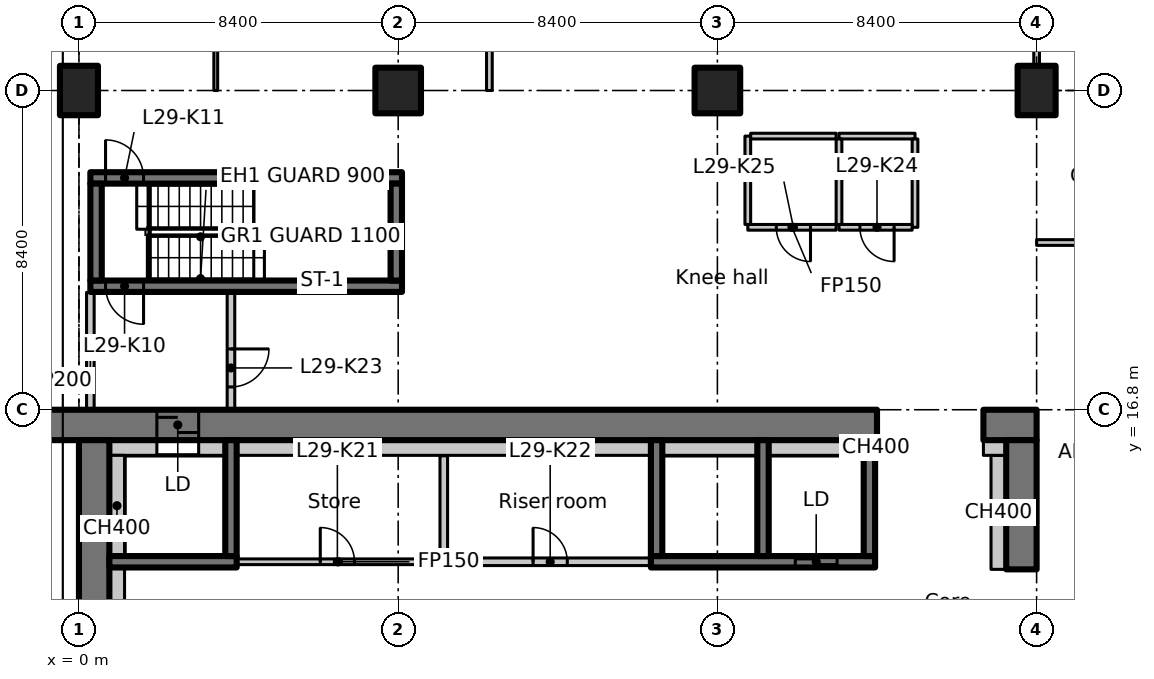
"""IFC4 building model, lengths in metres.
Left out: names, types, materials, properties, quantities, classifications, styles, units other than length and angle.
Written with IfcOpenShell. Run it as: python <this file> out.ifc"""

import sys

from ifc_helpers import new_model, si_unit, direction, frame, frame_2d, origin, origin_2d, place, context, subcontext, project, spatial, polyline, rectangle, outline, extrude, element, fill, save


model = new_model("IFC4")
c1 = context("Model", 3, precision=1e-05, world=origin(), true_north=direction((0.0, 1.0)))
c2 = subcontext(c1, "Body", "Model", "MODEL_VIEW")
j1 = project(units=[si_unit("LENGTHUNIT", "METRE"), si_unit("PLANEANGLEUNIT", "RADIAN")], contexts=[c1])
p1 = place(None, origin())
s1 = spatial("IfcSite", under=j1, at=p1, CompositionType="ELEMENT")
p2 = place(p1, origin())
s2 = spatial("IfcBuilding", under=s1, at=p2, CompositionType="ELEMENT")
p3 = place(p2, frame((0.0, 0.0, 120.5)))
s3 = spatial("IfcBuildingStorey", under=s2, at=p3, CompositionType="ELEMENT", Elevation=120.5)
p4 = place(p3, frame((0.0, 25.2, 0.0), z_axis=(0.0, 0.0, 1.0), x_axis=(1.0, 0.0, 0.0)))
e1 = element("IfcColumn", 1, at=p4, inside=s3, PredefinedType="COLUMN", context=c2, shape_type="SweptSolid", body=[
    extrude(rectangle(XDim=1.0, YDim=1.3, at=origin_2d()), origin(), (0.0, 0.0, 1.0), 3.35),
])
for number, where, z_axis, x_axis in (
    (2, (8.4, 25.2, 0.0), (0.0, 0.0, 1.0), (1.0, 0.0, 0.0)),
    (3, (16.8, 25.2, 0.0), (0.0, 0.0, 1.0), (1.0, 0.0, 0.0)),
):
    element("IfcColumn", number, at=place(p3, frame(where, z_axis=z_axis, x_axis=x_axis)), inside=s3, PredefinedType="COLUMN", context=c2, shape_type="SweptSolid", body=[
        extrude(rectangle(XDim=1.2, YDim=1.2, at=origin_2d()), origin(), (0.0, 0.0, 1.0), 3.35),
    ])
p5 = place(p3, frame((25.2, 25.2, 0.0), z_axis=(0.0, 0.0, 1.0), x_axis=(1.0, 0.0, 0.0)))
e4 = element("IfcColumn", 4, at=p5, inside=s3, PredefinedType="COLUMN", context=c2, shape_type="SweptSolid", body=[
    extrude(rectangle(XDim=1.0, YDim=1.3, at=origin_2d()), origin(), (0.0, 0.0, 1.0), 3.35),
])
p6 = place(p3, frame((-1.1, 16.4, 0.0), z_axis=(0.0, 0.0, 1.0), x_axis=(1.0, 0.0, 0.0)))
e5 = element("IfcWall", 5, at=p6, inside=s3, PredefinedType="SHEAR", context=c2, shape_type="SweptSolid", body=[
    extrude(rectangle(XDim=22.1, YDim=0.8, at=frame_2d((11.05, 0.0))), origin(), (0.0, 0.0, 1.0), 3.35),
])
p7 = place(p6, frame((3.15, 0.0, 0.0)))
e6 = element("IfcOpeningElement", 6, at=p7, cuts=e5, PredefinedType="OPENING", context=c2, shape_type="SweptSolid", body=[
    extrude(rectangle(XDim=1.1, YDim=2.3, at=frame_2d((0.55, 1.15))), frame((0.0, 0.41, 0.0), z_axis=(0.0, -1.0, 0.0), x_axis=(1.0, 0.0, 0.0)), (0.0, 0.0, 1.0), 0.82),
])
p8 = place(p3, frame((23.8, 16.4, 0.0), z_axis=(0.0, 0.0, 1.0), x_axis=(1.0, 0.0, 0.0)))
e7 = element("IfcWall", 7, at=p8, inside=s3, PredefinedType="SHEAR", context=c2, shape_type="SweptSolid", body=[
    extrude(rectangle(XDim=1.4, YDim=0.8, at=frame_2d((0.7, 0.0))), origin(), (0.0, 0.0, 1.0), 3.35),
])
p9 = place(p3, frame((0.4, 7.136, 0.0), z_axis=(0.0, 0.0, 1.0), x_axis=(0.0, 1.0, 0.0)))
e8 = element("IfcWall", 8, at=p9, inside=s3, PredefinedType="SHEAR", context=c2, shape_type="SweptSolid", body=[
    extrude(rectangle(XDim=8.864, YDim=0.8, at=frame_2d((4.432, 0.0))), origin(), (0.0, 0.0, 1.0), 3.35),
])
p10 = place(p3, frame((24.8, 12.6, 0.0), z_axis=(0.0, 0.0, 1.0), x_axis=(0.0, 1.0, 0.0)))
e9 = element("IfcWall", 9, at=p10, inside=s3, PredefinedType="SHEAR", context=c2, shape_type="SweptSolid", body=[
    extrude(rectangle(XDim=3.4, YDim=0.8, at=frame_2d((1.7, 0.0))), origin(), (0.0, 0.0, 1.0), 3.35),
])
p11 = place(p3, frame((24.2, 12.6, 0.0), z_axis=(0.0, 0.0, 1.0), x_axis=(0.0, 1.0, 0.0)))
e10 = element("IfcWall", 10, at=p11, inside=s3, PredefinedType="PARTITIONING", context=c2, shape_type="SweptSolid", body=[
    extrude(rectangle(XDim=3.0, YDim=0.4, at=frame_2d((1.5, 0.0))), origin(), (0.0, 0.0, 1.0), 3.35),
])
p12 = place(p3, frame((0.8, 15.8, 0.0), z_axis=(0.0, 0.0, 1.0), x_axis=(1.0, 0.0, 0.0)))
e11 = element("IfcWall", 11, at=p12, inside=s3, PredefinedType="PARTITIONING", context=c2, shape_type="SweptSolid", body=[
    extrude(rectangle(XDim=1.25, YDim=0.4, at=frame_2d((0.625, 0.0))), origin(), (0.0, 0.0, 1.0), 3.35),
])
p13 = place(p3, frame((23.8, 15.8, 0.0), z_axis=(0.0, 0.0, 1.0), x_axis=(1.0, 0.0, 0.0)))
e12 = element("IfcWall", 12, at=p13, inside=s3, PredefinedType="PARTITIONING", context=c2, shape_type="SweptSolid", body=[
    extrude(rectangle(XDim=0.6, YDim=0.4, at=frame_2d((0.3, 0.0))), origin(), (0.0, 0.0, 1.0), 3.35),
])
p14 = place(p3, frame((0.8, 12.8, 0.0), z_axis=(0.0, 0.0, 1.0), x_axis=(1.0, 0.0, 0.0)))
e13 = element("IfcWall", 13, at=p14, inside=s3, PredefinedType="SHEAR", context=c2, shape_type="SweptSolid", body=[
    extrude(rectangle(XDim=3.35, YDim=0.3, at=frame_2d((1.675, 0.0))), origin(), (0.0, 0.0, 1.0), 3.35),
])
p15 = place(p3, frame((4.0, 12.95, 0.0), z_axis=(0.0, 0.0, 1.0), x_axis=(0.0, 1.0, 0.0)))
e14 = element("IfcWall", 14, at=p15, inside=s3, PredefinedType="SHEAR", context=c2, shape_type="SweptSolid", body=[
    extrude(rectangle(XDim=3.05, YDim=0.3, at=frame_2d((1.525, 0.0))), origin(), (0.0, 0.0, 1.0), 3.35),
])
p16 = place(p3, frame((15.05, 12.8, 0.0), z_axis=(0.0, 0.0, 1.0), x_axis=(1.0, 0.0, 0.0)))
e15 = element("IfcWall", 15, at=p16, inside=s3, PredefinedType="SHEAR", context=c2, shape_type="SweptSolid", body=[
    extrude(rectangle(XDim=5.9, YDim=0.3, at=frame_2d((2.95, 0.0))), origin(), (0.0, 0.0, 1.0), 3.35),
])
p17 = place(p16, frame((3.8, 0.0, 0.0)))
e16 = element("IfcOpeningElement", 16, at=p17, cuts=e15, PredefinedType="OPENING", context=c2, shape_type="SweptSolid", body=[
    extrude(rectangle(XDim=1.1, YDim=2.3, at=frame_2d((0.55, 1.15))), frame((0.0, 0.16, 0.0), z_axis=(0.0, -1.0, 0.0), x_axis=(1.0, 0.0, 0.0)), (0.0, 0.0, 1.0), 0.32),
])
for number, where, z_axis, x_axis in (
    (17, (15.2, 12.95, 0.0), (0.0, 0.0, 1.0), (0.0, 1.0, 0.0)),
    (18, (18.0, 12.95, 0.0), (0.0, 0.0, 1.0), (0.0, 1.0, 0.0)),
    (19, (20.8, 12.95, 0.0), (0.0, 0.0, 1.0), (0.0, 1.0, 0.0)),
):
    element("IfcWall", number, at=place(p3, frame(where, z_axis=z_axis, x_axis=x_axis)), inside=s3, PredefinedType="SHEAR", context=c2, shape_type="SweptSolid", body=[
        extrude(rectangle(XDim=3.05, YDim=0.3, at=frame_2d((1.525, 0.0))), origin(), (0.0, 0.0, 1.0), 3.35),
    ])
p18 = place(p3, frame((8.5, 20.05, 0.0), z_axis=(0.0, 0.0, 1.0), x_axis=(-1.0, 0.0, 0.0)))
e20 = element("IfcWall", 20, at=p18, inside=s3, PredefinedType="SHEAR", context=c2, shape_type="SweptSolid", body=[
    extrude(rectangle(XDim=8.2, YDim=0.3, at=frame_2d((4.1, 0.0))), origin(), (0.0, 0.0, 1.0), 3.35),
])
p19 = place(p18, frame((6.8, 0.0, 0.0)))
e21 = element("IfcOpeningElement", 21, at=p19, cuts=e20, PredefinedType="OPENING", context=c2, shape_type="SweptSolid", body=[
    extrude(rectangle(XDim=1.0, YDim=2.1, at=frame_2d((0.5, 1.05))), frame((0.0, 0.16, 0.0), z_axis=(0.0, -1.0, 0.0), x_axis=(1.0, 0.0, 0.0)), (0.0, 0.0, 1.0), 0.32),
])
p20 = place(p3, frame((0.3, 22.9, 0.0), z_axis=(0.0, 0.0, 1.0), x_axis=(1.0, 0.0, 0.0)))
e22 = element("IfcWall", 22, at=p20, inside=s3, PredefinedType="SHEAR", context=c2, shape_type="SweptSolid", body=[
    extrude(rectangle(XDim=8.2, YDim=0.3, at=frame_2d((4.1, 0.0))), origin(), (0.0, 0.0, 1.0), 3.35),
])
p21 = place(p20, frame((0.4, 0.0, 0.0)))
e23 = element("IfcOpeningElement", 23, at=p21, cuts=e22, PredefinedType="OPENING", context=c2, shape_type="SweptSolid", body=[
    extrude(rectangle(XDim=1.0, YDim=2.1, at=frame_2d((0.5, 1.05))), frame((0.0, 0.16, 0.0), z_axis=(0.0, -1.0, 0.0), x_axis=(1.0, 0.0, 0.0)), (0.0, 0.0, 1.0), 0.32),
])
for number, where, z_axis, x_axis in (
    (24, (0.45, 20.2, 0.0), (0.0, 0.0, 1.0), (0.0, 1.0, 0.0)),
    (25, (8.35, 20.2, 0.0), (0.0, 0.0, 1.0), (0.0, 1.0, 0.0)),
):
    element("IfcWall", number, at=place(p3, frame(where, z_axis=z_axis, x_axis=x_axis)), inside=s3, PredefinedType="SHEAR", context=c2, shape_type="SweptSolid", body=[
        extrude(rectangle(XDim=2.55, YDim=0.3, at=frame_2d((1.275, 0.0))), origin(), (0.0, 0.0, 1.0), 3.35),
    ])
p22 = place(p3, frame((0.3, 16.812, 0.0), z_axis=(0.0, 0.0, 1.0), x_axis=(0.0, 1.0, 0.0)))
e26 = element("IfcWall", 26, at=p22, inside=s3, PredefinedType="PARTITIONING", context=c2, shape_type="SweptSolid", body=[
    extrude(rectangle(XDim=3.076, YDim=0.2, at=frame_2d((1.538, 0.0))), origin(), (0.0, 0.0, 1.0), 2.98),
])
p23 = place(p3, frame((4.0, 19.888, 0.0), z_axis=(0.0, 0.0, 1.0), x_axis=(0.0, -1.0, 0.0)))
e27 = element("IfcWall", 27, at=p23, inside=s3, PredefinedType="PARTITIONING", context=c2, shape_type="SweptSolid", body=[
    extrude(rectangle(XDim=3.076, YDim=0.2, at=frame_2d((1.538, 0.0))), origin(), (0.0, 0.0, 1.0), 3.35),
])
p24 = place(p23, frame((1.488, 0.0, 0.0)))
e28 = element("IfcOpeningElement", 28, at=p24, cuts=e27, PredefinedType="OPENING", context=c2, shape_type="SweptSolid", body=[
    extrude(rectangle(XDim=1.0, YDim=2.1, at=frame_2d((0.5, 1.05))), frame((0.0, 0.11, 0.0), z_axis=(0.0, -1.0, 0.0), x_axis=(1.0, 0.0, 0.0)), (0.0, 0.0, 1.0), 0.22),
])
p25 = place(p3, frame((9.6, 15.588, 0.0), z_axis=(0.0, 0.0, 1.0), x_axis=(0.0, -1.0, 0.0)))
e29 = element("IfcWall", 29, at=p25, inside=s3, PredefinedType="PARTITIONING", context=c2, shape_type="SweptSolid", body=[
    extrude(rectangle(XDim=2.788, YDim=0.2, at=frame_2d((1.394, 0.0))), origin(), (0.0, 0.0, 1.0), 3.35),
])
p26 = place(p3, frame((9.7, 12.8, 0.0), z_axis=(0.0, 0.0, 1.0), x_axis=(1.0, 0.0, 0.0)))
e30 = element("IfcWall", 30, at=p26, inside=s3, PredefinedType="PARTITIONING", context=c2, shape_type="SweptSolid", body=[
    extrude(rectangle(XDim=5.338, YDim=0.2, at=frame_2d((2.669, 0.0))), origin(), (0.0, 0.0, 1.0), 3.35),
])
p27 = place(p26, frame((2.25, 0.0, 0.0)))
e31 = element("IfcOpeningElement", 31, at=p27, cuts=e30, PredefinedType="OPENING", context=c2, shape_type="SweptSolid", body=[
    extrude(rectangle(XDim=0.9, YDim=2.1, at=frame_2d((0.45, 1.05))), frame((0.0, 0.11, 0.0), z_axis=(0.0, -1.0, 0.0), x_axis=(1.0, 0.0, 0.0)), (0.0, 0.0, 1.0), 0.22),
])
p28 = place(p3, frame((4.162, 12.8, 0.0), z_axis=(0.0, 0.0, 1.0), x_axis=(1.0, 0.0, 0.0)))
e32 = element("IfcWall", 32, at=p28, inside=s3, PredefinedType="PARTITIONING", context=c2, shape_type="SweptSolid", body=[
    extrude(rectangle(XDim=5.338, YDim=0.15, at=frame_2d((2.669, 0.0))), origin(), (0.0, 0.0, 1.0), 3.35),
])
p29 = place(p28, frame((2.188, 0.0, 0.0)))
e33 = element("IfcOpeningElement", 33, at=p29, cuts=e32, PredefinedType="OPENING", context=c2, shape_type="SweptSolid", body=[
    extrude(rectangle(XDim=0.9, YDim=2.1, at=frame_2d((0.45, 1.05))), frame((0.0, 0.085, 0.0), z_axis=(0.0, -1.0, 0.0), x_axis=(1.0, 0.0, 0.0)), (0.0, 0.0, 1.0), 0.17),
])
p30 = place(p3, frame((20.0, 24.0, 0.0), z_axis=(0.0, 0.0, 1.0), x_axis=(1.0, 0.0, 0.0)))
e34 = element("IfcWall", 34, at=p30, inside=s3, PredefinedType="PARTITIONING", context=c2, shape_type="SweptSolid", body=[
    extrude(rectangle(XDim=2.0, YDim=0.15, at=frame_2d((1.0, 0.0))), origin(), (0.0, 0.0, 1.0), 3.35),
])
p31 = place(p3, frame((22.0, 23.925, 0.0), z_axis=(0.0, 0.0, 1.0), x_axis=(0.0, -1.0, 0.0)))
e35 = element("IfcWall", 35, at=p31, inside=s3, PredefinedType="PARTITIONING", context=c2, shape_type="SweptSolid", body=[
    extrude(rectangle(XDim=2.325, YDim=0.15, at=frame_2d((1.163, 0.0))), origin(), (0.0, 0.0, 1.0), 3.35),
])
p32 = place(p3, frame((21.925, 21.6, 0.0), z_axis=(0.0, 0.0, 1.0), x_axis=(-1.0, 0.0, 0.0)))
e36 = element("IfcWall", 36, at=p32, inside=s3, PredefinedType="PARTITIONING", context=c2, shape_type="SweptSolid", body=[
    extrude(rectangle(XDim=1.925, YDim=0.15, at=frame_2d((0.962, 0.0))), origin(), (0.0, 0.0, 1.0), 3.35),
])
p33 = place(p32, frame((0.475, 0.0, 0.0)))
e37 = element("IfcOpeningElement", 37, at=p33, cuts=e36, PredefinedType="OPENING", context=c2, shape_type="SweptSolid", body=[
    extrude(rectangle(XDim=0.9, YDim=2.1, at=frame_2d((0.45, 1.05))), frame((0.0, 0.085, 0.0), z_axis=(0.0, -1.0, 0.0), x_axis=(1.0, 0.0, 0.0)), (0.0, 0.0, 1.0), 0.17),
])
p34 = place(p3, frame((20.0, 21.675, 0.0), z_axis=(0.0, 0.0, 1.0), x_axis=(0.0, 1.0, 0.0)))
e38 = element("IfcWall", 38, at=p34, inside=s3, PredefinedType="PARTITIONING", context=c2, shape_type="SweptSolid", body=[
    extrude(rectangle(XDim=2.25, YDim=0.15, at=frame_2d((1.125, 0.0))), origin(), (0.0, 0.0, 1.0), 3.35),
])
p35 = place(p3, frame((19.925, 21.6, 0.0), z_axis=(0.0, 0.0, 1.0), x_axis=(-1.0, 0.0, 0.0)))
e39 = element("IfcWall", 39, at=p35, inside=s3, PredefinedType="PARTITIONING", context=c2, shape_type="SweptSolid", body=[
    extrude(rectangle(XDim=2.325, YDim=0.15, at=frame_2d((1.163, 0.0))), origin(), (0.0, 0.0, 1.0), 3.35),
])
p36 = place(p35, frame((0.675, 0.0, 0.0)))
e40 = element("IfcOpeningElement", 40, at=p36, cuts=e39, PredefinedType="OPENING", context=c2, shape_type="SweptSolid", body=[
    extrude(rectangle(XDim=0.9, YDim=2.1, at=frame_2d((0.45, 1.05))), frame((0.0, 0.085, 0.0), z_axis=(0.0, -1.0, 0.0), x_axis=(1.0, 0.0, 0.0)), (0.0, 0.0, 1.0), 0.17),
])
p37 = place(p3, frame((17.6, 21.675, 0.0), z_axis=(0.0, 0.0, 1.0), x_axis=(0.0, 1.0, 0.0)))
e41 = element("IfcWall", 41, at=p37, inside=s3, PredefinedType="PARTITIONING", context=c2, shape_type="SweptSolid", body=[
    extrude(rectangle(XDim=2.325, YDim=0.15, at=frame_2d((1.163, 0.0))), origin(), (0.0, 0.0, 1.0), 3.35),
])
p38 = place(p3, frame((17.675, 24.0, 0.0), z_axis=(0.0, 0.0, 1.0), x_axis=(1.0, 0.0, 0.0)))
e42 = element("IfcWall", 42, at=p38, inside=s3, PredefinedType="PARTITIONING", context=c2, shape_type="SweptSolid", body=[
    extrude(rectangle(XDim=2.25, YDim=0.15, at=frame_2d((1.125, 0.0))), origin(), (0.0, 0.0, 1.0), 3.35),
])
p39 = place(p3, frame((1.0, 9.75, 0.0), z_axis=(0.0, 0.0, 1.0), x_axis=(0.0, 1.0, 0.0)))
e43 = element("IfcWall", 43, at=p39, inside=s3, PredefinedType="PARTITIONING", context=c2, shape_type="SweptSolid", body=[
    extrude(rectangle(XDim=2.9, YDim=0.4, at=frame_2d((1.45, 0.0))), origin(), (0.0, 0.0, 1.0), 3.35),
])
p40 = place(p3, frame((1.0, 12.95, 0.0), z_axis=(0.0, 0.0, 1.0), x_axis=(0.0, 1.0, 0.0)))
e44 = element("IfcWall", 44, at=p40, inside=s3, PredefinedType="PARTITIONING", context=c2, shape_type="SweptSolid", body=[
    extrude(rectangle(XDim=2.65, YDim=0.4, at=frame_2d((1.325, 0.0))), origin(), (0.0, 0.0, 1.0), 3.35),
])
p41 = place(p3, frame((3.15, 15.8, 0.0), z_axis=(0.0, 0.0, 1.0), x_axis=(1.0, 0.0, 0.0)))
e45 = element("IfcWall", 45, at=p41, inside=s3, PredefinedType="PARTITIONING", context=c2, shape_type="SweptSolid", body=[
    extrude(rectangle(XDim=0.7, YDim=0.4, at=frame_2d((0.35, 0.0))), origin(), (0.0, 0.0, 1.0), 3.35),
])
p42 = place(p3, frame((4.15, 15.8, 0.0), z_axis=(0.0, 0.0, 1.0), x_axis=(1.0, 0.0, 0.0)))
e46 = element("IfcWall", 46, at=p42, inside=s3, PredefinedType="PARTITIONING", context=c2, shape_type="SweptSolid", body=[
    extrude(rectangle(XDim=10.9, YDim=0.4, at=frame_2d((5.45, 0.0))), origin(), (0.0, 0.0, 1.0), 3.35),
])
for number, where, z_axis, x_axis in (
    (47, (15.35, 15.8, 0.0), (0.0, 0.0, 1.0), (1.0, 0.0, 0.0)),
    (48, (18.15, 15.8, 0.0), (0.0, 0.0, 1.0), (1.0, 0.0, 0.0)),
):
    element("IfcWall", number, at=place(p3, frame(where, z_axis=z_axis, x_axis=x_axis)), inside=s3, PredefinedType="PARTITIONING", context=c2, shape_type="SweptSolid", body=[
        extrude(rectangle(XDim=2.5, YDim=0.4, at=frame_2d((1.25, 0.0))), origin(), (0.0, 0.0, 1.0), 3.35),
    ])
p43 = place(p3, frame((20.95, 15.8, 0.0), z_axis=(0.0, 0.0, 1.0), x_axis=(1.0, 0.0, 0.0)))
e49 = element("IfcWall", 49, at=p43, inside=s3, PredefinedType="PARTITIONING", context=c2, shape_type="SweptSolid", body=[
    extrude(rectangle(XDim=0.05, YDim=0.4, at=frame_2d((0.025, 0.0))), origin(), (0.0, 0.0, 1.0), 3.35),
])
p44 = place(p3, frame((25.2, 21.2, 0.0), z_axis=(0.0, 0.0, 1.0), x_axis=(1.0, 0.0, 0.0)))
e50 = element("IfcWall", 50, at=p44, inside=s3, PredefinedType="PARTITIONING", context=c2, shape_type="SweptSolid", body=[
    extrude(rectangle(XDim=4.2, YDim=0.15, at=frame_2d((2.1, 0.0))), origin(), (0.0, 0.0, 1.0), 3.33),
])
p45 = place(p3, frame((25.2, 31.0, 0.0), z_axis=(0.0, 0.0, 1.0), x_axis=(0.0, -1.0, 0.0)))
e51 = element("IfcWall", 51, at=p45, inside=s3, PredefinedType="PARTITIONING", context=c2, shape_type="SweptSolid", body=[
    extrude(outline(polyline([(0.0, 0.0), (5.13, 0.0), (5.13, 2.98), (0.0, 2.98), (0.0, 0.0)])), frame((0.0, 0.075, 0.0), z_axis=(0.0, -1.0, 0.0), x_axis=(1.0, 0.0, 0.0)), (0.0, 0.0, 1.0), 0.15),
])
p46 = place(p45, frame((1.93, 0.0, 0.0)))
e52 = element("IfcOpeningElement", 52, at=p46, cuts=e51, PredefinedType="OPENING", context=c2, shape_type="SweptSolid", body=[
    extrude(rectangle(XDim=1.1, YDim=2.1, at=frame_2d((0.55, 1.05))), frame((0.0, 0.085, 0.0), z_axis=(0.0, -1.0, 0.0), x_axis=(1.0, 0.0, 0.0)), (0.0, 0.0, 1.0), 0.17),
])
p47 = place(p3, frame((10.8, 25.2, 0.0), z_axis=(0.0, 0.0, 1.0), x_axis=(0.0, 1.0, 0.0)))
e53 = element("IfcWall", 53, at=p47, inside=s3, PredefinedType="PARTITIONING", context=c2, shape_type="SweptSolid", body=[
    extrude(rectangle(XDim=4.2, YDim=0.15, at=frame_2d((2.1, 0.0))), origin(), (0.0, 0.0, 1.0), 3.33),
])
p48 = place(p3, frame((3.6, 29.4, 0.0), z_axis=(0.0, 0.0, 1.0), x_axis=(0.0, -1.0, 0.0)))
e54 = element("IfcWall", 54, at=p48, inside=s3, PredefinedType="PARTITIONING", context=c2, shape_type="SweptSolid", body=[
    extrude(rectangle(XDim=4.2, YDim=0.1, at=frame_2d((2.1, 0.0))), origin(), (0.0, 0.0, 1.0), 3.33),
])
p49 = place(p7, origin())
e55 = element("IfcDoor", 55, at=p49, inside=s3, OperationType="SLIDING_TO_LEFT", PredefinedType="DOOR", context=c2, shape_type="SweptSolid", body=[
    extrude(rectangle(XDim=1.1, YDim=2.3, at=frame_2d((0.55, 1.15))), frame((0.0, 0.025, 0.0), z_axis=(0.0, -1.0, 0.0), x_axis=(1.0, 0.0, 0.0)), (0.0, 0.0, 1.0), 0.05),
])
fill(e6, e55)
p50 = place(p17, origin())
e56 = element("IfcDoor", 56, at=p50, inside=s3, OperationType="SLIDING_TO_LEFT", PredefinedType="DOOR", context=c2, shape_type="SweptSolid", body=[
    extrude(rectangle(XDim=1.1, YDim=2.3, at=frame_2d((0.55, 1.15))), frame((0.0, 0.025, 0.0), z_axis=(0.0, -1.0, 0.0), x_axis=(1.0, 0.0, 0.0)), (0.0, 0.0, 1.0), 0.05),
])
fill(e16, e56)
p51 = place(p19, origin())
e57 = element("IfcDoor", 57, at=p51, inside=s3, OperationType="SINGLE_SWING_LEFT", PredefinedType="DOOR", context=c2, shape_type="SweptSolid", body=[
    extrude(rectangle(XDim=1.0, YDim=2.1, at=frame_2d((0.5, 1.05))), frame((0.0, 0.025, 0.0), z_axis=(0.0, -1.0, 0.0), x_axis=(1.0, 0.0, 0.0)), (0.0, 0.0, 1.0), 0.05),
])
fill(e21, e57)
p52 = place(p21, origin())
e58 = element("IfcDoor", 58, at=p52, inside=s3, OperationType="SINGLE_SWING_RIGHT", PredefinedType="DOOR", context=c2, shape_type="SweptSolid", body=[
    extrude(rectangle(XDim=1.0, YDim=2.1, at=frame_2d((0.5, 1.05))), frame((0.0, 0.025, 0.0), z_axis=(0.0, -1.0, 0.0), x_axis=(1.0, 0.0, 0.0)), (0.0, 0.0, 1.0), 0.05),
])
fill(e23, e58)
p53 = place(p29, origin())
e59 = element("IfcDoor", 59, at=p53, inside=s3, OperationType="SINGLE_SWING_RIGHT", PredefinedType="DOOR", context=c2, shape_type="SweptSolid", body=[
    extrude(rectangle(XDim=0.9, YDim=2.1, at=frame_2d((0.45, 1.05))), frame((0.0, 0.025, 0.0), z_axis=(0.0, -1.0, 0.0), x_axis=(1.0, 0.0, 0.0)), (0.0, 0.0, 1.0), 0.05),
])
fill(e33, e59)
p54 = place(p27, origin())
e60 = element("IfcDoor", 60, at=p54, inside=s3, OperationType="SINGLE_SWING_LEFT", PredefinedType="DOOR", context=c2, shape_type="SweptSolid", body=[
    extrude(rectangle(XDim=0.9, YDim=2.1, at=frame_2d((0.45, 1.05))), frame((0.0, 0.025, 0.0), z_axis=(0.0, -1.0, 0.0), x_axis=(1.0, 0.0, 0.0)), (0.0, 0.0, 1.0), 0.05),
])
fill(e31, e60)
p55 = place(p24, origin())
e61 = element("IfcDoor", 61, at=p55, inside=s3, OperationType="SINGLE_SWING_RIGHT", PredefinedType="DOOR", context=c2, shape_type="SweptSolid", body=[
    extrude(rectangle(XDim=1.0, YDim=2.1, at=frame_2d((0.5, 1.05))), frame((0.0, 0.025, 0.0), z_axis=(0.0, -1.0, 0.0), x_axis=(1.0, 0.0, 0.0)), (0.0, 0.0, 1.0), 0.05),
])
fill(e28, e61)
p56 = place(p33, origin())
e62 = element("IfcDoor", 62, at=p56, inside=s3, OperationType="SINGLE_SWING_LEFT", PredefinedType="DOOR", context=c2, shape_type="SweptSolid", body=[
    extrude(rectangle(XDim=0.9, YDim=2.1, at=frame_2d((0.45, 1.05))), frame((0.0, 0.025, 0.0), z_axis=(0.0, -1.0, 0.0), x_axis=(1.0, 0.0, 0.0)), (0.0, 0.0, 1.0), 0.05),
])
fill(e37, e62)
p57 = place(p36, origin())
e63 = element("IfcDoor", 63, at=p57, inside=s3, OperationType="SINGLE_SWING_RIGHT", PredefinedType="DOOR", context=c2, shape_type="SweptSolid", body=[
    extrude(rectangle(XDim=0.9, YDim=2.1, at=frame_2d((0.45, 1.05))), frame((0.0, 0.025, 0.0), z_axis=(0.0, -1.0, 0.0), x_axis=(1.0, 0.0, 0.0)), (0.0, 0.0, 1.0), 0.05),
])
fill(e40, e63)
save(model, sys.argv[1])
